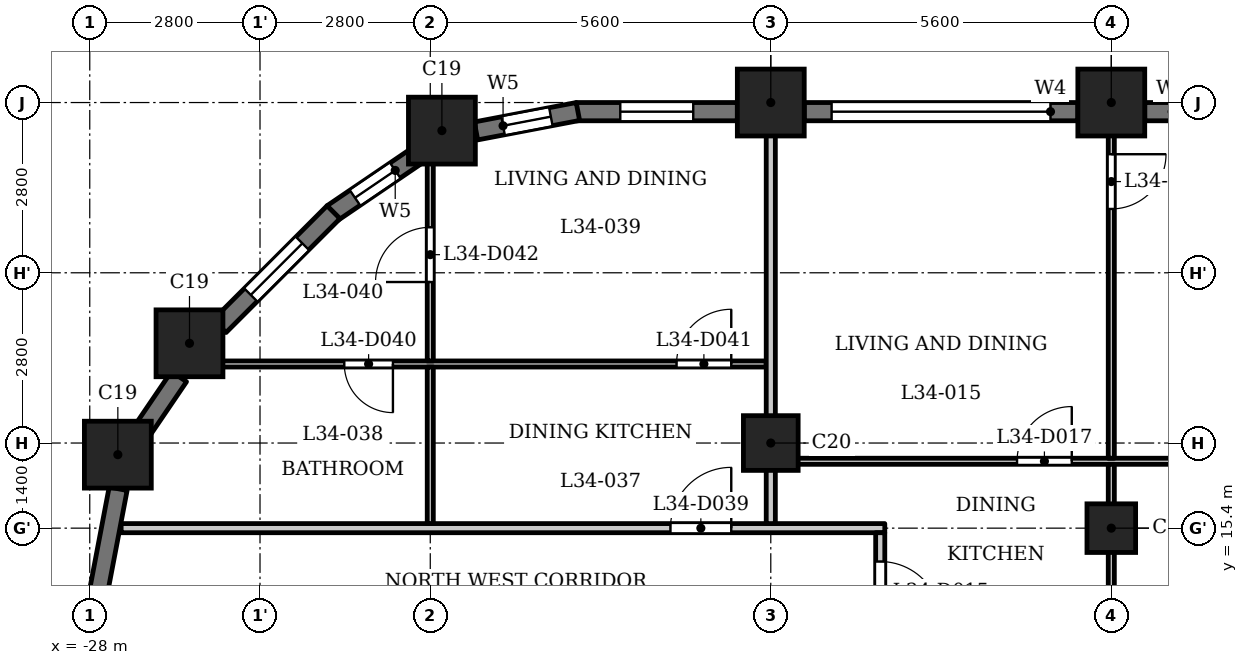
"""IFC4 building model, lengths in metres.
Left out: names, types, materials, properties, quantities, classifications, styles, units other than length and angle.
Written with IfcOpenShell. Run it as: python <this file> out.ifc"""

import sys

from ifc_helpers import new_model, si_unit, direction, frame, frame_2d, origin, origin_2d, place, context, subcontext, project, spatial, rectangle, extrude, element, fill, save


model = new_model("IFC4")
c1 = context("Model", 3, precision=1e-05, world=origin(), true_north=direction((0.0, 1.0)))
c2 = subcontext(c1, "Body", "Model", "MODEL_VIEW")
j1 = project(units=[si_unit("LENGTHUNIT", "METRE"), si_unit("PLANEANGLEUNIT", "RADIAN")], contexts=[c1])
p1 = place(None, origin())
s1 = spatial("IfcSite", under=j1, at=p1, CompositionType="ELEMENT")
p2 = place(p1, origin())
s2 = spatial("IfcBuilding", under=s1, at=p2, CompositionType="ELEMENT")
p3 = place(p2, frame((0.0, 0.0, 136.1)))
s3 = spatial("IfcBuildingStorey", under=s2, at=p3, CompositionType="ELEMENT", Elevation=136.1)
for number, where, z_axis, x_axis in (
    (1, (-11.2, 22.4, 0.0), (0.0, 0.0, 1.0), (1.0, 0.0, 0.0)),
    (2, (-16.8, 22.4, 0.0), (0.0, 0.0, 1.0), (1.0, 0.0, 0.0)),
    (3, (-22.209, 21.938, 0.0), (0.0, 0.0, 1.0), (1.0, 0.0, 0.0)),
    (4, (-26.36, 18.44, 0.0), (0.0, 0.0, 1.0), (1.0, 0.0, 0.0)),
    (5, (-27.538, 16.609, 0.0), (0.0, 0.0, 1.0), (1.0, 0.0, 0.0)),
):
    element("IfcColumn", number, at=place(p3, frame(where, z_axis=z_axis, x_axis=x_axis)), inside=s3, PredefinedType="COLUMN", context=c2, shape_type="SweptSolid", body=[
        extrude(rectangle(XDim=1.1, YDim=1.1, at=origin_2d()), origin(), (0.0, 0.0, 1.0), 3.5),
    ])
p4 = place(p3, frame((-16.8, 16.8, 0.0), z_axis=(0.0, 0.0, 1.0), x_axis=(1.0, 0.0, 0.0)))
e6 = element("IfcColumn", 6, at=p4, inside=s3, PredefinedType="COLUMN", context=c2, shape_type="SweptSolid", body=[
    extrude(rectangle(XDim=0.9, YDim=0.9, at=origin_2d()), origin(), (0.0, 0.0, 1.0), 3.5),
])
p5 = place(p3, frame((-11.2, 15.4, 0.0), z_axis=(0.0, 0.0, 1.0), x_axis=(1.0, 0.0, 0.0)))
e7 = element("IfcColumn", 7, at=p5, inside=s3, PredefinedType="COLUMN", context=c2, shape_type="SweptSolid", body=[
    extrude(rectangle(XDim=0.8, YDim=0.8, at=origin_2d()), origin(), (0.0, 0.0, 1.0), 3.5),
])
p6 = place(p3, frame((-6.15, 22.25, 0.0), z_axis=(0.0, 0.0, 1.0), x_axis=(-1.0, 0.0, 0.0)))
e8 = element("IfcWall", 8, at=p6, inside=s3, PredefinedType="SOLIDWALL", context=c2, shape_type="SweptSolid", body=[
    extrude(rectangle(XDim=4.5, YDim=0.3, at=frame_2d((2.25, 0.0))), origin(), (0.0, 0.0, 1.0), 2.45),
])
p7 = place(p6, frame((0.45, 0.0, 1.2)))
e9 = element("IfcOpeningElement", 9, at=p7, cuts=e8, PredefinedType="OPENING", context=c2, shape_type="SweptSolid", body=[
    extrude(rectangle(XDim=3.6, YDim=0.95, at=frame_2d((1.8, 0.475))), frame((0.0, 0.16, 0.0), z_axis=(0.0, -1.0, 0.0), x_axis=(1.0, 0.0, 0.0)), (0.0, 0.0, 1.0), 0.32),
])
p8 = place(p3, frame((-11.75, 22.25, 0.0), z_axis=(0.0, 0.0, 1.0), x_axis=(-1.0, 0.0, 0.0)))
e10 = element("IfcWall", 10, at=p8, inside=s3, PredefinedType="SOLIDWALL", context=c2, shape_type="SweptSolid", body=[
    extrude(rectangle(XDim=4.5, YDim=0.3, at=frame_2d((2.25, 0.0))), origin(), (0.0, 0.0, 1.0), 2.45),
])
p9 = place(p8, frame((0.45, 0.0, 1.2)))
e11 = element("IfcOpeningElement", 11, at=p9, cuts=e10, PredefinedType="OPENING", context=c2, shape_type="SweptSolid", body=[
    extrude(rectangle(XDim=3.6, YDim=0.95, at=frame_2d((1.8, 0.475))), frame((0.0, 0.16, 0.0), z_axis=(0.0, -1.0, 0.0), x_axis=(1.0, 0.0, 0.0)), (0.0, 0.0, 1.0), 0.32),
])
p10 = place(p3, frame((-17.35, 22.25, 0.0), z_axis=(0.0, 0.0, 1.0), x_axis=(-1.0, 0.0, 0.0)))
e12 = element("IfcWall", 12, at=p10, inside=s3, PredefinedType="SOLIDWALL", context=c2, shape_type="SweptSolid", body=[
    extrude(rectangle(XDim=2.65, YDim=0.3, at=frame_2d((1.325, 0.0))), origin(), (0.0, 0.0, 1.0), 2.45),
])
p11 = place(p10, frame((0.725, 0.0, 0.6)))
e13 = element("IfcOpeningElement", 13, at=p11, cuts=e12, PredefinedType="OPENING", context=c2, shape_type="SweptSolid", body=[
    extrude(rectangle(XDim=1.2, YDim=1.55, at=frame_2d((0.6, 0.775))), frame((0.0, 0.16, 0.0), z_axis=(0.0, -1.0, 0.0), x_axis=(1.0, 0.0, 0.0)), (0.0, 0.0, 1.0), 0.32),
])
p12 = place(p3, frame((-19.972, 22.253, 0.0), z_axis=(0.0, 0.0, 1.0), x_axis=(-0.982297206936, -0.187329114784, 0.0)))
e14 = element("IfcWall", 14, at=p12, inside=s3, PredefinedType="SOLIDWALL", context=c2, shape_type="SweptSolid", body=[
    extrude(rectangle(XDim=1.706, YDim=0.3, at=frame_2d((0.853, 0.0))), origin(), (0.0, 0.0, 1.0), 2.45),
])
p13 = place(p12, frame((0.453, 0.0, 0.6)))
e15 = element("IfcOpeningElement", 15, at=p13, cuts=e14, PredefinedType="OPENING", context=c2, shape_type="SweptSolid", body=[
    extrude(rectangle(XDim=0.8, YDim=1.55, at=frame_2d((0.4, 0.775))), frame((0.0, 0.16, 0.0), z_axis=(0.0, -1.0, 0.0), x_axis=(1.0, 0.0, 0.0)), (0.0, 0.0, 1.0), 0.32),
])
p14 = place(p3, frame((-22.602, 21.538, 0.0), z_axis=(0.0, 0.0, 1.0), x_axis=(-0.827040942766, -0.562141689424, 0.0)))
e16 = element("IfcWall", 16, at=p14, inside=s3, PredefinedType="SOLIDWALL", context=c2, shape_type="SweptSolid", body=[
    extrude(rectangle(XDim=1.706, YDim=0.3, at=frame_2d((0.853, 0.0))), origin(), (0.0, 0.0, 1.0), 2.45),
])
p15 = place(p14, frame((0.453, 0.0, 0.6)))
e17 = element("IfcOpeningElement", 17, at=p15, cuts=e16, PredefinedType="OPENING", context=c2, shape_type="SweptSolid", body=[
    extrude(rectangle(XDim=0.8, YDim=1.55, at=frame_2d((0.4, 0.775))), frame((0.0, 0.16, 0.0), z_axis=(0.0, -1.0, 0.0), x_axis=(1.0, 0.0, 0.0)), (0.0, 0.0, 1.0), 0.32),
])
p16 = place(p3, frame((-23.991, 20.597, 0.0), z_axis=(0.0, 0.0, 1.0), x_axis=(-0.707106781187, -0.707106781187, 0.0)))
e18 = element("IfcWall", 18, at=p16, inside=s3, PredefinedType="SOLIDWALL", context=c2, shape_type="SweptSolid", body=[
    extrude(rectangle(XDim=2.65, YDim=0.3, at=frame_2d((1.325, 0.0))), origin(), (0.0, 0.0, 1.0), 2.45),
])
p17 = place(p16, frame((0.725, 0.0, 0.6)))
e19 = element("IfcOpeningElement", 19, at=p17, cuts=e18, PredefinedType="OPENING", context=c2, shape_type="SweptSolid", body=[
    extrude(rectangle(XDim=1.2, YDim=1.55, at=frame_2d((0.6, 0.775))), frame((0.0, 0.16, 0.0), z_axis=(0.0, -1.0, 0.0), x_axis=(1.0, 0.0, 0.0)), (0.0, 0.0, 1.0), 0.32),
])
p18 = place(p3, frame((-26.532, 17.893, 0.0), z_axis=(0.0, 0.0, 1.0), x_axis=(-0.562105419172, -0.82706559458, 0.0)))
e20 = element("IfcWall", 20, at=p18, inside=s3, PredefinedType="SOLIDWALL", context=c2, shape_type="SweptSolid", body=[
    extrude(rectangle(XDim=1.077, YDim=0.3, at=frame_2d((0.539, 0.0))), origin(), (0.0, 0.0, 1.0), 3.2),
])
p19 = place(p3, frame((-27.533, 16.048, 0.0), z_axis=(0.0, 0.0, 1.0), x_axis=(-0.187302784601, -0.982302227871, 0.0)))
e21 = element("IfcWall", 21, at=p19, inside=s3, PredefinedType="SOLIDWALL", context=c2, shape_type="SweptSolid", body=[
    extrude(rectangle(XDim=1.706, YDim=0.3, at=frame_2d((0.853, 0.0))), origin(), (0.0, 0.0, 1.0), 2.45),
])
p20 = place(p3, frame((-27.484, 15.4, 0.0), z_axis=(0.0, 0.0, 1.0), x_axis=(1.0, 0.0, 0.0)))
e22 = element("IfcWall", 22, at=p20, inside=s3, PredefinedType="PARTITIONING", context=c2, shape_type="SweptSolid", body=[
    extrude(rectangle(XDim=12.559, YDim=0.15, at=frame_2d((6.279, 0.0))), origin(), (0.0, 0.0, 1.0), 3.2),
])
p21 = place(p20, frame((9.034, 0.0, 0.0)))
e23 = element("IfcOpeningElement", 23, at=p21, cuts=e22, PredefinedType="OPENING", context=c2, shape_type="SweptSolid", body=[
    extrude(rectangle(XDim=1.0, YDim=2.1, at=frame_2d((0.5, 1.05))), frame((0.0, 0.085, 0.0), z_axis=(0.0, -1.0, 0.0), x_axis=(1.0, 0.0, 0.0)), (0.0, 0.0, 1.0), 0.17),
])
p22 = place(p3, frame((-16.725, 16.5, 0.0), z_axis=(0.0, 0.0, 1.0), x_axis=(1.0, 0.0, 0.0)))
e24 = element("IfcWall", 24, at=p22, inside=s3, PredefinedType="PARTITIONING", context=c2, shape_type="SweptSolid", body=[
    extrude(rectangle(XDim=33.45, YDim=0.1, at=frame_2d((16.725, 0.0))), origin(), (0.0, 0.0, 1.0), 3.2),
])
p23 = place(p22, frame((9.675, 0.0, 0.0)))
e25 = element("IfcOpeningElement", 25, at=p23, cuts=e24, PredefinedType="OPENING", context=c2, shape_type="SweptSolid", body=[
    extrude(rectangle(XDim=0.8, YDim=2.1, at=frame_2d((0.4, 1.05))), frame((0.0, 0.06, 0.0), z_axis=(0.0, -1.0, 0.0), x_axis=(1.0, 0.0, 0.0)), (0.0, 0.0, 1.0), 0.12),
])
p24 = place(p22, frame((3.975, 0.0, 0.0)))
e26 = element("IfcOpeningElement", 26, at=p24, cuts=e24, PredefinedType="OPENING", context=c2, shape_type="SweptSolid", body=[
    extrude(rectangle(XDim=0.9, YDim=2.1, at=frame_2d((0.45, 1.05))), frame((0.0, 0.06, 0.0), z_axis=(0.0, -1.0, 0.0), x_axis=(1.0, 0.0, 0.0)), (0.0, 0.0, 1.0), 0.12),
])
p25 = place(p22, frame((12.025, 0.0, 0.0)))
e27 = element("IfcOpeningElement", 27, at=p25, cuts=e24, PredefinedType="OPENING", context=c2, shape_type="SweptSolid", body=[
    extrude(rectangle(XDim=0.8, YDim=2.1, at=frame_2d((0.4, 1.05))), frame((0.0, 0.06, 0.0), z_axis=(0.0, -1.0, 0.0), x_axis=(1.0, 0.0, 0.0)), (0.0, 0.0, 1.0), 0.12),
])
p26 = place(p22, frame((15.175, 0.0, 0.0)))
e28 = element("IfcOpeningElement", 28, at=p26, cuts=e24, PredefinedType="OPENING", context=c2, shape_type="SweptSolid", body=[
    extrude(rectangle(XDim=0.9, YDim=2.1, at=frame_2d((0.45, 1.05))), frame((0.0, 0.06, 0.0), z_axis=(0.0, -1.0, 0.0), x_axis=(1.0, 0.0, 0.0)), (0.0, 0.0, 1.0), 0.12),
])
p27 = place(p22, frame((20.975, 0.0, 0.0)))
e29 = element("IfcOpeningElement", 29, at=p27, cuts=e24, PredefinedType="OPENING", context=c2, shape_type="SweptSolid", body=[
    extrude(rectangle(XDim=0.8, YDim=2.1, at=frame_2d((0.4, 1.05))), frame((0.0, 0.06, 0.0), z_axis=(0.0, -1.0, 0.0), x_axis=(1.0, 0.0, 0.0)), (0.0, 0.0, 1.0), 0.12),
])
p28 = place(p22, frame((18.175, 0.0, 0.0)))
e30 = element("IfcOpeningElement", 30, at=p28, cuts=e24, PredefinedType="OPENING", context=c2, shape_type="SweptSolid", body=[
    extrude(rectangle(XDim=0.9, YDim=2.1, at=frame_2d((0.45, 1.05))), frame((0.0, 0.06, 0.0), z_axis=(0.0, -1.0, 0.0), x_axis=(1.0, 0.0, 0.0)), (0.0, 0.0, 1.0), 0.12),
])
p29 = place(p22, frame((23.725, 0.0, 0.0)))
e31 = element("IfcOpeningElement", 31, at=p29, cuts=e24, PredefinedType="OPENING", context=c2, shape_type="SweptSolid", body=[
    extrude(rectangle(XDim=0.8, YDim=2.1, at=frame_2d((0.4, 1.05))), frame((0.0, 0.06, 0.0), z_axis=(0.0, -1.0, 0.0), x_axis=(1.0, 0.0, 0.0)), (0.0, 0.0, 1.0), 0.12),
])
p30 = place(p22, frame((26.125, 0.0, 0.0)))
e32 = element("IfcOpeningElement", 32, at=p30, cuts=e24, PredefinedType="OPENING", context=c2, shape_type="SweptSolid", body=[
    extrude(rectangle(XDim=0.9, YDim=2.1, at=frame_2d((0.45, 1.05))), frame((0.0, 0.06, 0.0), z_axis=(0.0, -1.0, 0.0), x_axis=(1.0, 0.0, 0.0)), (0.0, 0.0, 1.0), 0.12),
])
p31 = place(p22, frame((32.125, 0.0, 0.0)))
e33 = element("IfcOpeningElement", 33, at=p31, cuts=e24, PredefinedType="OPENING", context=c2, shape_type="SweptSolid", body=[
    extrude(rectangle(XDim=0.8, YDim=2.1, at=frame_2d((0.4, 1.05))), frame((0.0, 0.06, 0.0), z_axis=(0.0, -1.0, 0.0), x_axis=(1.0, 0.0, 0.0)), (0.0, 0.0, 1.0), 0.12),
])
p32 = place(p22, frame((28.975, 0.0, 0.0)))
e34 = element("IfcOpeningElement", 34, at=p32, cuts=e24, PredefinedType="OPENING", context=c2, shape_type="SweptSolid", body=[
    extrude(rectangle(XDim=0.9, YDim=2.1, at=frame_2d((0.45, 1.05))), frame((0.0, 0.06, 0.0), z_axis=(0.0, -1.0, 0.0), x_axis=(1.0, 0.0, 0.0)), (0.0, 0.0, 1.0), 0.12),
])
p33 = place(p3, frame((-26.44, 18.1, 0.0), z_axis=(0.0, 0.0, 1.0), x_axis=(1.0, 0.0, 0.0)))
e35 = element("IfcWall", 35, at=p33, inside=s3, PredefinedType="PARTITIONING", context=c2, shape_type="SweptSolid", body=[
    extrude(rectangle(XDim=9.565, YDim=0.1, at=frame_2d((4.782, 0.0))), origin(), (0.0, 0.0, 1.0), 3.2),
])
p34 = place(p33, frame((2.626, 0.0, 0.0)))
e36 = element("IfcOpeningElement", 36, at=p34, cuts=e35, PredefinedType="OPENING", context=c2, shape_type="SweptSolid", body=[
    extrude(rectangle(XDim=0.8, YDim=2.1, at=frame_2d((0.4, 1.05))), frame((0.0, 0.06, 0.0), z_axis=(0.0, -1.0, 0.0), x_axis=(1.0, 0.0, 0.0)), (0.0, 0.0, 1.0), 0.12),
])
p35 = place(p33, frame((8.09, 0.0, 0.0)))
e37 = element("IfcOpeningElement", 37, at=p35, cuts=e35, PredefinedType="OPENING", context=c2, shape_type="SweptSolid", body=[
    extrude(rectangle(XDim=0.9, YDim=2.1, at=frame_2d((0.45, 1.05))), frame((0.0, 0.06, 0.0), z_axis=(0.0, -1.0, 0.0), x_axis=(1.0, 0.0, 0.0)), (0.0, 0.0, 1.0), 0.12),
])
p36 = place(p3, frame((-22.4, 15.475, 0.0), z_axis=(0.0, 0.0, 1.0), x_axis=(0.0, 1.0, 0.0)))
e38 = element("IfcWall", 38, at=p36, inside=s3, PredefinedType="PARTITIONING", context=c2, shape_type="SweptSolid", body=[
    extrude(rectangle(XDim=2.575, YDim=0.1, at=frame_2d((1.288, 0.0))), origin(), (0.0, 0.0, 1.0), 3.2),
])
p37 = place(p3, frame((-22.4, 18.15, 0.0), z_axis=(0.0, 0.0, 1.0), x_axis=(0.0, 1.0, 0.0)))
e39 = element("IfcWall", 39, at=p37, inside=s3, PredefinedType="PARTITIONING", context=c2, shape_type="SweptSolid", body=[
    extrude(rectangle(XDim=3.57, YDim=0.1, at=frame_2d((1.785, 0.0))), origin(), (0.0, 0.0, 1.0), 3.2),
])
p38 = place(p37, frame((1.298, 0.0, 0.0)))
e40 = element("IfcOpeningElement", 40, at=p38, cuts=e39, PredefinedType="OPENING", context=c2, shape_type="SweptSolid", body=[
    extrude(rectangle(XDim=0.9, YDim=2.1, at=frame_2d((0.45, 1.05))), frame((0.0, 0.06, 0.0), z_axis=(0.0, -1.0, 0.0), x_axis=(1.0, 0.0, 0.0)), (0.0, 0.0, 1.0), 0.12),
])
p39 = place(p3, frame((-16.8, 15.475, 0.0), z_axis=(0.0, 0.0, 1.0), x_axis=(0.0, 1.0, 0.0)))
e41 = element("IfcWall", 41, at=p39, inside=s3, PredefinedType="PARTITIONING", context=c2, shape_type="SweptSolid", body=[
    extrude(rectangle(XDim=7.455, YDim=0.15, at=frame_2d((3.728, 0.0))), origin(), (0.0, 0.0, 1.0), 3.2),
])
p40 = place(p3, frame((-15.0, 13.275, 0.0), z_axis=(0.0, 0.0, 1.0), x_axis=(0.0, 1.0, 0.0)))
e42 = element("IfcWall", 42, at=p40, inside=s3, PredefinedType="PARTITIONING", context=c2, shape_type="SweptSolid", body=[
    extrude(rectangle(XDim=2.05, YDim=0.15, at=frame_2d((1.025, 0.0))), origin(), (0.0, 0.0, 1.0), 3.2),
])
p41 = place(p40, frame((0.576, 0.0, 0.0)))
e43 = element("IfcOpeningElement", 43, at=p41, cuts=e42, PredefinedType="OPENING", context=c2, shape_type="SweptSolid", body=[
    extrude(rectangle(XDim=1.0, YDim=2.1, at=frame_2d((0.5, 1.05))), frame((0.0, 0.085, 0.0), z_axis=(0.0, -1.0, 0.0), x_axis=(1.0, 0.0, 0.0)), (0.0, 0.0, 1.0), 0.17),
])
p42 = place(p3, frame((-11.2, 13.275, 0.0), z_axis=(0.0, 0.0, 1.0), x_axis=(0.0, 1.0, 0.0)))
e44 = element("IfcWall", 44, at=p42, inside=s3, PredefinedType="PARTITIONING", context=c2, shape_type="SweptSolid", body=[
    extrude(rectangle(XDim=3.175, YDim=0.1, at=frame_2d((1.587, 0.0))), origin(), (0.0, 0.0, 1.0), 3.2),
])
p43 = place(p3, frame((-11.2, 16.55, 0.0), z_axis=(0.0, 0.0, 1.0), x_axis=(0.0, 1.0, 0.0)))
e45 = element("IfcWall", 45, at=p43, inside=s3, PredefinedType="PARTITIONING", context=c2, shape_type="SweptSolid", body=[
    extrude(rectangle(XDim=6.38, YDim=0.1, at=frame_2d((3.19, 0.0))), origin(), (0.0, 0.0, 1.0), 3.2),
])
p44 = place(p43, frame((4.1, 0.0, 0.0)))
e46 = element("IfcOpeningElement", 46, at=p44, cuts=e45, PredefinedType="OPENING", context=c2, shape_type="SweptSolid", body=[
    extrude(rectangle(XDim=0.9, YDim=2.1, at=frame_2d((0.45, 1.05))), frame((0.0, 0.06, 0.0), z_axis=(0.0, -1.0, 0.0), x_axis=(1.0, 0.0, 0.0)), (0.0, 0.0, 1.0), 0.12),
])
p45 = place(p41, origin())
e47 = element("IfcDoor", 47, at=p45, inside=s3, OperationType="SINGLE_SWING_LEFT", PredefinedType="DOOR", context=c2, shape_type="SweptSolid", body=[
    extrude(rectangle(XDim=1.0, YDim=2.1, at=frame_2d((0.5, 1.05))), frame((0.0, 0.025, 0.0), z_axis=(0.0, -1.0, 0.0), x_axis=(1.0, 0.0, 0.0)), (0.0, 0.0, 1.0), 0.05),
])
fill(e43, e47)
p46 = place(p24, origin())
e48 = element("IfcDoor", 48, at=p46, inside=s3, OperationType="SINGLE_SWING_LEFT", PredefinedType="DOOR", context=c2, shape_type="SweptSolid", body=[
    extrude(rectangle(XDim=0.9, YDim=2.1, at=frame_2d((0.45, 1.05))), frame((0.0, 0.025, 0.0), z_axis=(0.0, -1.0, 0.0), x_axis=(1.0, 0.0, 0.0)), (0.0, 0.0, 1.0), 0.05),
])
fill(e26, e48)
p47 = place(p44, origin())
e49 = element("IfcDoor", 49, at=p47, inside=s3, OperationType="SINGLE_SWING_RIGHT", PredefinedType="DOOR", context=c2, shape_type="SweptSolid", body=[
    extrude(rectangle(XDim=0.9, YDim=2.1, at=frame_2d((0.45, 1.05))), frame((0.0, 0.025, 0.0), z_axis=(0.0, -1.0, 0.0), x_axis=(1.0, 0.0, 0.0)), (0.0, 0.0, 1.0), 0.05),
])
fill(e46, e49)
p48 = place(p21, origin())
e50 = element("IfcDoor", 50, at=p48, inside=s3, OperationType="SINGLE_SWING_LEFT", PredefinedType="DOOR", context=c2, shape_type="SweptSolid", body=[
    extrude(rectangle(XDim=1.0, YDim=2.1, at=frame_2d((0.5, 1.05))), frame((0.0, 0.025, 0.0), z_axis=(0.0, -1.0, 0.0), x_axis=(1.0, 0.0, 0.0)), (0.0, 0.0, 1.0), 0.05),
])
fill(e23, e50)
p49 = place(p34, origin())
e51 = element("IfcDoor", 51, at=p49, inside=s3, OperationType="SINGLE_SWING_RIGHT", PredefinedType="DOOR", context=c2, shape_type="SweptSolid", body=[
    extrude(rectangle(XDim=0.8, YDim=2.1, at=frame_2d((0.4, 1.05))), frame((0.0, 0.025, 0.0), z_axis=(0.0, -1.0, 0.0), x_axis=(1.0, 0.0, 0.0)), (0.0, 0.0, 1.0), 0.05),
])
fill(e36, e51)
p50 = place(p35, origin())
e52 = element("IfcDoor", 52, at=p50, inside=s3, OperationType="SINGLE_SWING_LEFT", PredefinedType="DOOR", context=c2, shape_type="SweptSolid", body=[
    extrude(rectangle(XDim=0.9, YDim=2.1, at=frame_2d((0.45, 1.05))), frame((0.0, 0.025, 0.0), z_axis=(0.0, -1.0, 0.0), x_axis=(1.0, 0.0, 0.0)), (0.0, 0.0, 1.0), 0.05),
])
fill(e37, e52)
p51 = place(p38, origin())
e53 = element("IfcDoor", 53, at=p51, inside=s3, OperationType="SINGLE_SWING_RIGHT", PredefinedType="DOOR", context=c2, shape_type="SweptSolid", body=[
    extrude(rectangle(XDim=0.9, YDim=2.1, at=frame_2d((0.45, 1.05))), frame((0.0, 0.025, 0.0), z_axis=(0.0, -1.0, 0.0), x_axis=(1.0, 0.0, 0.0)), (0.0, 0.0, 1.0), 0.05),
])
fill(e40, e53)
p52 = place(p9, origin())
e54 = element("IfcWindow", 54, at=p52, inside=s3, PartitioningType="SINGLE_PANEL", PredefinedType="WINDOW", context=c2, shape_type="SweptSolid", body=[
    extrude(rectangle(XDim=3.6, YDim=0.95, at=frame_2d((1.8, 0.475))), frame((0.0, 0.03, 0.0), z_axis=(0.0, -1.0, 0.0), x_axis=(1.0, 0.0, 0.0)), (0.0, 0.0, 1.0), 0.06),
])
fill(e11, e54)
p53 = place(p11, origin())
e55 = element("IfcWindow", 55, at=p53, inside=s3, PartitioningType="SINGLE_PANEL", PredefinedType="WINDOW", context=c2, shape_type="SweptSolid", body=[
    extrude(rectangle(XDim=1.2, YDim=1.55, at=frame_2d((0.6, 0.775))), frame((0.0, 0.03, 0.0), z_axis=(0.0, -1.0, 0.0), x_axis=(1.0, 0.0, 0.0)), (0.0, 0.0, 1.0), 0.06),
])
fill(e13, e55)
p54 = place(p13, origin())
e56 = element("IfcWindow", 56, at=p54, inside=s3, PartitioningType="SINGLE_PANEL", PredefinedType="WINDOW", context=c2, shape_type="SweptSolid", body=[
    extrude(rectangle(XDim=0.8, YDim=1.55, at=frame_2d((0.4, 0.775))), frame((0.0, 0.03, 0.0), z_axis=(0.0, -1.0, 0.0), x_axis=(1.0, 0.0, 0.0)), (0.0, 0.0, 1.0), 0.06),
])
fill(e15, e56)
p55 = place(p15, origin())
e57 = element("IfcWindow", 57, at=p55, inside=s3, PartitioningType="SINGLE_PANEL", PredefinedType="WINDOW", context=c2, shape_type="SweptSolid", body=[
    extrude(rectangle(XDim=0.8, YDim=1.55, at=frame_2d((0.4, 0.775))), frame((0.0, 0.03, 0.0), z_axis=(0.0, -1.0, 0.0), x_axis=(1.0, 0.0, 0.0)), (0.0, 0.0, 1.0), 0.06),
])
fill(e17, e57)
p56 = place(p17, origin())
e58 = element("IfcWindow", 58, at=p56, inside=s3, PartitioningType="SINGLE_PANEL", PredefinedType="WINDOW", context=c2, shape_type="SweptSolid", body=[
    extrude(rectangle(XDim=1.2, YDim=1.55, at=frame_2d((0.6, 0.775))), frame((0.0, 0.03, 0.0), z_axis=(0.0, -1.0, 0.0), x_axis=(1.0, 0.0, 0.0)), (0.0, 0.0, 1.0), 0.06),
])
fill(e19, e58)
save(model, sys.argv[1])
